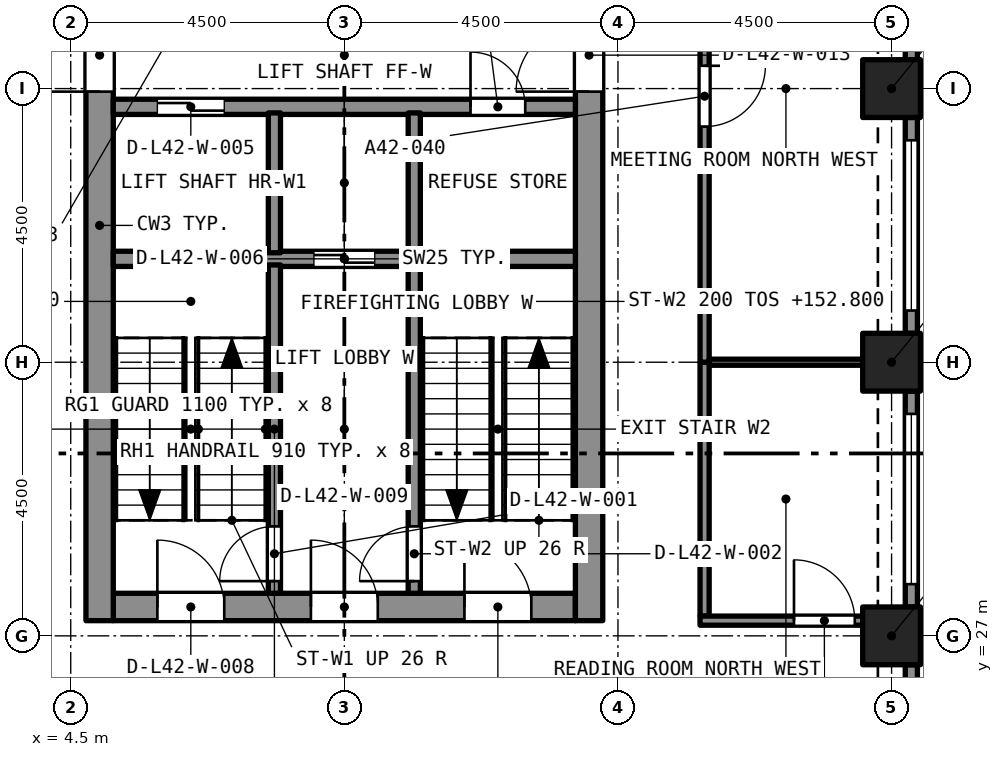
"""IFC4 building model, lengths in metres.
Left out: names, types, materials, properties, quantities, classifications, styles, units other than length and angle.
Written with IfcOpenShell. Run it as: python <this file> out.ifc"""

import sys

from ifc_helpers import new_model, si_unit, direction, frame, frame_2d, origin, origin_2d, place, context, subcontext, project, spatial, rectangle, extrude, element, fill, save


model = new_model("IFC4")
c1 = context("Model", 3, precision=1e-05, world=origin(), true_north=direction((0.0, 1.0)))
c2 = subcontext(c1, "Body", "Model", "MODEL_VIEW")
j1 = project(units=[si_unit("LENGTHUNIT", "METRE"), si_unit("PLANEANGLEUNIT", "RADIAN")], contexts=[c1])
p1 = place(None, origin())
s1 = spatial("IfcSite", under=j1, at=p1, CompositionType="ELEMENT")
p2 = place(p1, origin())
s2 = spatial("IfcBuilding", under=s1, at=p2, CompositionType="ELEMENT")
p3 = place(p2, frame((0.0, 0.0, 150.6)))
s3 = spatial("IfcBuildingStorey", under=s2, at=p3, CompositionType="ELEMENT", Elevation=150.6)
for number, where, z_axis, x_axis in (
    (1, (18.0, 27.0, 0.0), (0.0, 0.0, 1.0), (1.0, 0.0, 0.0)),
    (2, (18.0, 31.5, 0.0), (0.0, 0.0, 1.0), (1.0, 0.0, 0.0)),
    (3, (18.0, 36.0, 0.0), (0.0, 0.0, 1.0), (1.0, 0.0, 0.0)),
):
    element("IfcColumn", number, at=place(p3, frame(where, z_axis=z_axis, x_axis=x_axis)), inside=s3, PredefinedType="COLUMN", context=c2, shape_type="SweptSolid", body=[
        extrude(rectangle(XDim=0.95, YDim=0.95, at=origin_2d()), origin(), (0.0, 0.0, 1.0), 4.4),
    ])
p4 = place(p3, frame((5.2, 27.475, 0.0), z_axis=(0.0, 0.0, 1.0), x_axis=(1.0, 0.0, 0.0)))
e4 = element("IfcWall", 4, at=p4, inside=s3, PredefinedType="SOLIDWALL", context=c2, shape_type="SweptSolid", body=[
    extrude(rectangle(XDim=7.6, YDim=0.45, at=frame_2d((3.8, 0.0))), origin(), (0.0, 0.0, 1.0), 4.4),
])
p5 = place(p4, frame((0.725, 0.0, 0.0)))
e5 = element("IfcOpeningElement", 5, at=p5, cuts=e4, PredefinedType="OPENING", context=c2, shape_type="SweptSolid", body=[
    extrude(rectangle(XDim=1.1, YDim=2.1, at=frame_2d((0.55, 1.05))), frame((0.0, 0.235, 0.0), z_axis=(0.0, -1.0, 0.0), x_axis=(1.0, 0.0, 0.0)), (0.0, 0.0, 1.0), 0.47),
])
p6 = place(p4, frame((3.25, 0.0, 0.0)))
e6 = element("IfcOpeningElement", 6, at=p6, cuts=e4, PredefinedType="OPENING", context=c2, shape_type="SweptSolid", body=[
    extrude(rectangle(XDim=1.1, YDim=2.1, at=frame_2d((0.55, 1.05))), frame((0.0, 0.235, 0.0), z_axis=(0.0, -1.0, 0.0), x_axis=(1.0, 0.0, 0.0)), (0.0, 0.0, 1.0), 0.47),
])
p7 = place(p4, frame((5.775, 0.0, 0.0)))
e7 = element("IfcOpeningElement", 7, at=p7, cuts=e4, PredefinedType="OPENING", context=c2, shape_type="SweptSolid", body=[
    extrude(rectangle(XDim=1.1, YDim=2.1, at=frame_2d((0.55, 1.05))), frame((0.0, 0.235, 0.0), z_axis=(0.0, -1.0, 0.0), x_axis=(1.0, 0.0, 0.0)), (0.0, 0.0, 1.0), 0.47),
])
p8 = place(p3, frame((4.975, 27.25, 0.0), z_axis=(0.0, 0.0, 1.0), x_axis=(0.0, 1.0, 0.0)))
e8 = element("IfcWall", 8, at=p8, inside=s3, PredefinedType="SOLIDWALL", context=c2, shape_type="SweptSolid", body=[
    extrude(rectangle(XDim=13.0, YDim=0.45, at=frame_2d((6.5, 0.0))), origin(), (0.0, 0.0, 1.0), 4.4),
])
p9 = place(p8, frame((8.7, 0.0, 0.0)))
e9 = element("IfcOpeningElement", 9, at=p9, cuts=e8, PredefinedType="OPENING", context=c2, shape_type="SweptSolid", body=[
    extrude(rectangle(XDim=1.2, YDim=2.1, at=frame_2d((0.6, 1.05))), frame((0.0, 0.235, 0.0), z_axis=(0.0, -1.0, 0.0), x_axis=(1.0, 0.0, 0.0)), (0.0, 0.0, 1.0), 0.47),
])
p10 = place(p3, frame((13.025, 27.25, 0.0), z_axis=(0.0, 0.0, 1.0), x_axis=(0.0, 1.0, 0.0)))
e10 = element("IfcWall", 10, at=p10, inside=s3, PredefinedType="SOLIDWALL", context=c2, shape_type="SweptSolid", body=[
    extrude(rectangle(XDim=13.0, YDim=0.45, at=frame_2d((6.5, 0.0))), origin(), (0.0, 0.0, 1.0), 4.4),
])
p11 = place(p10, frame((10.85, 0.0, 0.0)))
e11 = element("IfcOpeningElement", 11, at=p11, cuts=e10, PredefinedType="OPENING", context=c2, shape_type="SweptSolid", body=[
    extrude(rectangle(XDim=1.1, YDim=2.1, at=frame_2d((0.55, 1.05))), frame((0.0, 0.235, 0.0), z_axis=(0.0, -1.0, 0.0), x_axis=(1.0, 0.0, 0.0)), (0.0, 0.0, 1.0), 0.47),
])
p12 = place(p10, frame((8.7, 0.0, 0.0)))
e12 = element("IfcOpeningElement", 12, at=p12, cuts=e10, PredefinedType="OPENING", context=c2, shape_type="SweptSolid", body=[
    extrude(rectangle(XDim=1.2, YDim=2.1, at=frame_2d((0.6, 1.05))), frame((0.0, 0.235, 0.0), z_axis=(0.0, -1.0, 0.0), x_axis=(1.0, 0.0, 0.0)), (0.0, 0.0, 1.0), 0.47),
])
p13 = place(p3, frame((18.325, 26.525, 0.0), z_axis=(0.0, 0.0, 1.0), x_axis=(0.0, -1.0, 0.0)))
e13 = element("IfcWall", 13, at=p13, inside=s3, PredefinedType="SOLIDWALL", context=c2, shape_type="SweptSolid", body=[
    extrude(rectangle(XDim=3.55, YDim=0.2, at=frame_2d((1.775, 0.0))), origin(), (0.0, 0.0, 1.0), 4.4),
])
p14 = place(p13, frame((0.375, 0.0, 0.45)))
e14 = element("IfcOpeningElement", 14, at=p14, cuts=e13, PredefinedType="OPENING", context=c2, shape_type="SweptSolid", body=[
    extrude(rectangle(XDim=2.8, YDim=2.55, at=frame_2d((1.4, 1.275))), frame((0.0, 0.11, 0.0), z_axis=(0.0, -1.0, 0.0), x_axis=(1.0, 0.0, 0.0)), (0.0, 0.0, 1.0), 0.22),
])
p15 = place(p3, frame((18.325, 31.025, 0.0), z_axis=(0.0, 0.0, 1.0), x_axis=(0.0, -1.0, 0.0)))
e15 = element("IfcWall", 15, at=p15, inside=s3, PredefinedType="SOLIDWALL", context=c2, shape_type="SweptSolid", body=[
    extrude(rectangle(XDim=3.55, YDim=0.2, at=frame_2d((1.775, 0.0))), origin(), (0.0, 0.0, 1.0), 4.4),
])
p16 = place(p15, frame((0.375, 0.0, 0.45)))
e16 = element("IfcOpeningElement", 16, at=p16, cuts=e15, PredefinedType="OPENING", context=c2, shape_type="SweptSolid", body=[
    extrude(rectangle(XDim=2.8, YDim=2.55, at=frame_2d((1.4, 1.275))), frame((0.0, 0.11, 0.0), z_axis=(0.0, -1.0, 0.0), x_axis=(1.0, 0.0, 0.0)), (0.0, 0.0, 1.0), 0.22),
])
p17 = place(p3, frame((18.325, 35.525, 0.0), z_axis=(0.0, 0.0, 1.0), x_axis=(0.0, -1.0, 0.0)))
e17 = element("IfcWall", 17, at=p17, inside=s3, PredefinedType="SOLIDWALL", context=c2, shape_type="SweptSolid", body=[
    extrude(rectangle(XDim=3.55, YDim=0.2, at=frame_2d((1.775, 0.0))), origin(), (0.0, 0.0, 1.0), 4.4),
])
p18 = place(p17, frame((0.375, 0.0, 0.45)))
e18 = element("IfcOpeningElement", 18, at=p18, cuts=e17, PredefinedType="OPENING", context=c2, shape_type="SweptSolid", body=[
    extrude(rectangle(XDim=2.8, YDim=2.55, at=frame_2d((1.4, 1.275))), frame((0.0, 0.11, 0.0), z_axis=(0.0, -1.0, 0.0), x_axis=(1.0, 0.0, 0.0)), (0.0, 0.0, 1.0), 0.22),
])
p19 = place(p3, frame((18.325, 40.025, 0.0), z_axis=(0.0, 0.0, 1.0), x_axis=(0.0, -1.0, 0.0)))
e19 = element("IfcWall", 19, at=p19, inside=s3, PredefinedType="SOLIDWALL", context=c2, shape_type="SweptSolid", body=[
    extrude(rectangle(XDim=3.55, YDim=0.2, at=frame_2d((1.775, 0.0))), origin(), (0.0, 0.0, 1.0), 4.4),
])
p20 = place(p19, frame((0.375, 0.0, 0.45)))
e20 = element("IfcOpeningElement", 20, at=p20, cuts=e19, PredefinedType="OPENING", context=c2, shape_type="SweptSolid", body=[
    extrude(rectangle(XDim=2.8, YDim=2.55, at=frame_2d((1.4, 1.275))), frame((0.0, 0.11, 0.0), z_axis=(0.0, -1.0, 0.0), x_axis=(1.0, 0.0, 0.0)), (0.0, 0.0, 1.0), 0.22),
])
p21 = place(p3, frame((14.925, 27.325, 0.0), z_axis=(0.0, 0.0, 1.0), x_axis=(0.0, 1.0, 0.0)))
e21 = element("IfcWall", 21, at=p21, inside=s3, PredefinedType="PARTITIONING", context=c2, shape_type="SweptSolid", body=[
    extrude(rectangle(XDim=4.175, YDim=0.15, at=frame_2d((2.087, 0.0))), origin(), (0.0, 0.0, 1.0), 4.1),
])
p22 = place(p3, frame((14.85, 27.25, 0.0), z_axis=(0.0, 0.0, 1.0), x_axis=(1.0, 0.0, 0.0)))
e22 = element("IfcWall", 22, at=p22, inside=s3, PredefinedType="PARTITIONING", context=c2, shape_type="SweptSolid", body=[
    extrude(rectangle(XDim=2.675, YDim=0.15, at=frame_2d((1.337, 0.0))), origin(), (0.0, 0.0, 1.0), 4.1),
])
p23 = place(p22, frame((1.545, 0.0, 0.0)))
e23 = element("IfcOpeningElement", 23, at=p23, cuts=e22, PredefinedType="OPENING", context=c2, shape_type="SweptSolid", body=[
    extrude(rectangle(XDim=1.0, YDim=2.1, at=frame_2d((0.5, 1.05))), frame((0.0, 0.085, 0.0), z_axis=(0.0, -1.0, 0.0), x_axis=(1.0, 0.0, 0.0)), (0.0, 0.0, 1.0), 0.17),
])
p24 = place(p3, frame((14.925, 40.175, 0.0), z_axis=(0.0, 0.0, 1.0), x_axis=(0.0, -1.0, 0.0)))
e24 = element("IfcWall", 24, at=p24, inside=s3, PredefinedType="PARTITIONING", context=c2, shape_type="SweptSolid", body=[
    extrude(rectangle(XDim=8.675, YDim=0.15, at=frame_2d((4.337, 0.0))), origin(), (0.0, 0.0, 1.0), 4.1),
])
p25 = place(p24, frame((3.8, 0.0, 0.0)))
e25 = element("IfcOpeningElement", 25, at=p25, cuts=e24, PredefinedType="OPENING", context=c2, shape_type="SweptSolid", body=[
    extrude(rectangle(XDim=1.0, YDim=2.1, at=frame_2d((0.5, 1.05))), frame((0.0, 0.085, 0.0), z_axis=(0.0, -1.0, 0.0), x_axis=(1.0, 0.0, 0.0)), (0.0, 0.0, 1.0), 0.17),
])
p26 = place(p3, frame((15.0, 31.5, 0.0), z_axis=(0.0, 0.0, 1.0), x_axis=(1.0, 0.0, 0.0)))
e26 = element("IfcWall", 26, at=p26, inside=s3, PredefinedType="PARTITIONING", context=c2, shape_type="SweptSolid", body=[
    extrude(rectangle(XDim=2.525, YDim=0.1, at=frame_2d((1.262, 0.0))), origin(), (0.0, 0.0, 1.0), 4.1),
])
p27 = place(p3, frame((5.2, 33.2, 0.0), z_axis=(0.0, 0.0, 1.0), x_axis=(1.0, 0.0, 0.0)))
e27 = element("IfcWall", 27, at=p27, inside=s3, PredefinedType="SOLIDWALL", context=c2, shape_type="SweptSolid", body=[
    extrude(rectangle(XDim=7.6, YDim=0.25, at=frame_2d((3.8, 0.0))), origin(), (0.0, 0.0, 1.0), 4.1),
])
p28 = place(p27, frame((3.3, 0.0, 0.0)))
e28 = element("IfcOpeningElement", 28, at=p28, cuts=e27, PredefinedType="OPENING", context=c2, shape_type="SweptSolid", body=[
    extrude(rectangle(XDim=1.0, YDim=2.1, at=frame_2d((0.5, 1.05))), frame((0.0, 0.135, 0.0), z_axis=(0.0, -1.0, 0.0), x_axis=(1.0, 0.0, 0.0)), (0.0, 0.0, 1.0), 0.27),
])
p29 = place(p3, frame((5.2, 35.7, 0.0), z_axis=(0.0, 0.0, 1.0), x_axis=(1.0, 0.0, 0.0)))
e29 = element("IfcWall", 29, at=p29, inside=s3, PredefinedType="SOLIDWALL", context=c2, shape_type="SweptSolid", body=[
    extrude(rectangle(XDim=7.6, YDim=0.25, at=frame_2d((3.8, 0.0))), origin(), (0.0, 0.0, 1.0), 4.1),
])
p30 = place(p29, frame((0.725, 0.0, 0.0)))
e30 = element("IfcOpeningElement", 30, at=p30, cuts=e29, PredefinedType="OPENING", context=c2, shape_type="SweptSolid", body=[
    extrude(rectangle(XDim=1.1, YDim=2.4, at=frame_2d((0.55, 1.2))), frame((0.0, 0.135, 0.0), z_axis=(0.0, -1.0, 0.0), x_axis=(1.0, 0.0, 0.0)), (0.0, 0.0, 1.0), 0.27),
])
p31 = place(p29, frame((5.875, 0.0, 0.0)))
e31 = element("IfcOpeningElement", 31, at=p31, cuts=e29, PredefinedType="OPENING", context=c2, shape_type="SweptSolid", body=[
    extrude(rectangle(XDim=0.9, YDim=2.1, at=frame_2d((0.45, 1.05))), frame((0.0, 0.135, 0.0), z_axis=(0.0, -1.0, 0.0), x_axis=(1.0, 0.0, 0.0)), (0.0, 0.0, 1.0), 0.27),
])
p32 = place(p3, frame((7.85, 27.7, 0.0), z_axis=(0.0, 0.0, 1.0), x_axis=(0.0, 1.0, 0.0)))
e32 = element("IfcWall", 32, at=p32, inside=s3, PredefinedType="SOLIDWALL", context=c2, shape_type="SweptSolid", body=[
    extrude(rectangle(XDim=5.4, YDim=0.2, at=frame_2d((2.7, 0.0))), origin(), (0.0, 0.0, 1.0), 4.1),
])
p33 = place(p32, frame((0.2, 0.0, 0.0)))
e33 = element("IfcOpeningElement", 33, at=p33, cuts=e32, PredefinedType="OPENING", context=c2, shape_type="SweptSolid", body=[
    extrude(rectangle(XDim=0.9, YDim=2.1, at=frame_2d((0.45, 1.05))), frame((0.0, 0.11, 0.0), z_axis=(0.0, -1.0, 0.0), x_axis=(1.0, 0.0, 0.0)), (0.0, 0.0, 1.0), 0.22),
])
p34 = place(p3, frame((10.15, 27.7, 0.0), z_axis=(0.0, 0.0, 1.0), x_axis=(0.0, 1.0, 0.0)))
e34 = element("IfcWall", 34, at=p34, inside=s3, PredefinedType="SOLIDWALL", context=c2, shape_type="SweptSolid", body=[
    extrude(rectangle(XDim=5.4, YDim=0.2, at=frame_2d((2.7, 0.0))), origin(), (0.0, 0.0, 1.0), 4.1),
])
p35 = place(p34, frame((0.2, 0.0, 0.0)))
e35 = element("IfcOpeningElement", 35, at=p35, cuts=e34, PredefinedType="OPENING", context=c2, shape_type="SweptSolid", body=[
    extrude(rectangle(XDim=0.9, YDim=2.1, at=frame_2d((0.45, 1.05))), frame((0.0, 0.11, 0.0), z_axis=(0.0, -1.0, 0.0), x_axis=(1.0, 0.0, 0.0)), (0.0, 0.0, 1.0), 0.22),
])
for number, where, z_axis, x_axis in (
    (36, (7.85, 33.3, 0.0), (0.0, 0.0, 1.0), (0.0, 1.0, 0.0)),
    (37, (10.15, 33.3, 0.0), (0.0, 0.0, 1.0), (0.0, 1.0, 0.0)),
):
    element("IfcWall", number, at=place(p3, frame(where, z_axis=z_axis, x_axis=x_axis)), inside=s3, PredefinedType="SOLIDWALL", context=c2, shape_type="SweptSolid", body=[
        extrude(rectangle(XDim=2.3, YDim=0.2, at=frame_2d((1.15, 0.0))), origin(), (0.0, 0.0, 1.0), 4.1),
    ])
p36 = place(p16, origin())
e38 = element("IfcWindow", 38, at=p36, inside=s3, PartitioningType="SINGLE_PANEL", PredefinedType="WINDOW", context=c2, shape_type="SweptSolid", body=[
    extrude(rectangle(XDim=2.8, YDim=2.55, at=frame_2d((1.4, 1.275))), frame((0.0, 0.03, 0.0), z_axis=(0.0, -1.0, 0.0), x_axis=(1.0, 0.0, 0.0)), (0.0, 0.0, 1.0), 0.06),
])
fill(e16, e38)
p37 = place(p18, origin())
e39 = element("IfcWindow", 39, at=p37, inside=s3, PartitioningType="SINGLE_PANEL", PredefinedType="WINDOW", context=c2, shape_type="SweptSolid", body=[
    extrude(rectangle(XDim=2.8, YDim=2.55, at=frame_2d((1.4, 1.275))), frame((0.0, 0.03, 0.0), z_axis=(0.0, -1.0, 0.0), x_axis=(1.0, 0.0, 0.0)), (0.0, 0.0, 1.0), 0.06),
])
fill(e18, e39)
p38 = place(p23, origin())
e40 = element("IfcDoor", 40, at=p38, inside=s3, OperationType="SINGLE_SWING_RIGHT", PredefinedType="DOOR", context=c2, shape_type="SweptSolid", body=[
    extrude(rectangle(XDim=1.0, YDim=2.1, at=frame_2d((0.5, 1.05))), frame((0.0, 0.025, 0.0), z_axis=(0.0, -1.0, 0.0), x_axis=(1.0, 0.0, 0.0)), (0.0, 0.0, 1.0), 0.05),
])
fill(e23, e40)
p39 = place(p25, origin())
e41 = element("IfcDoor", 41, at=p39, inside=s3, OperationType="SINGLE_SWING_LEFT", PredefinedType="DOOR", context=c2, shape_type="SweptSolid", body=[
    extrude(rectangle(XDim=1.0, YDim=2.1, at=frame_2d((0.5, 1.05))), frame((0.0, 0.025, 0.0), z_axis=(0.0, -1.0, 0.0), x_axis=(1.0, 0.0, 0.0)), (0.0, 0.0, 1.0), 0.05),
])
fill(e25, e41)
p40 = place(p33, origin())
e42 = element("IfcDoor", 42, at=p40, inside=s3, OperationType="SINGLE_SWING_LEFT", PredefinedType="DOOR", context=c2, shape_type="SweptSolid", body=[
    extrude(rectangle(XDim=0.9, YDim=2.1, at=frame_2d((0.45, 1.05))), frame((0.0, 0.025, 0.0), z_axis=(0.0, -1.0, 0.0), x_axis=(1.0, 0.0, 0.0)), (0.0, 0.0, 1.0), 0.05),
])
fill(e33, e42)
p41 = place(p35, origin())
e43 = element("IfcDoor", 43, at=p41, inside=s3, OperationType="SINGLE_SWING_LEFT", PredefinedType="DOOR", context=c2, shape_type="SweptSolid", body=[
    extrude(rectangle(XDim=0.9, YDim=2.1, at=frame_2d((0.45, 1.05))), frame((0.0, 0.025, 0.0), z_axis=(0.0, -1.0, 0.0), x_axis=(1.0, 0.0, 0.0)), (0.0, 0.0, 1.0), 0.05),
])
fill(e35, e43)
p42 = place(p30, origin())
e44 = element("IfcDoor", 44, at=p42, inside=s3, OperationType="SLIDING_TO_LEFT", PredefinedType="DOOR", context=c2, shape_type="SweptSolid", body=[
    extrude(rectangle(XDim=1.1, YDim=2.4, at=frame_2d((0.55, 1.2))), frame((0.0, 0.025, 0.0), z_axis=(0.0, -1.0, 0.0), x_axis=(1.0, 0.0, 0.0)), (0.0, 0.0, 1.0), 0.05),
])
fill(e30, e44)
p43 = place(p28, origin())
e45 = element("IfcDoor", 45, at=p43, inside=s3, OperationType="SLIDING_TO_LEFT", PredefinedType="DOOR", context=c2, shape_type="SweptSolid", body=[
    extrude(rectangle(XDim=1.0, YDim=2.1, at=frame_2d((0.5, 1.05))), frame((0.0, 0.025, 0.0), z_axis=(0.0, -1.0, 0.0), x_axis=(1.0, 0.0, 0.0)), (0.0, 0.0, 1.0), 0.05),
])
fill(e28, e45)
p44 = place(p31, origin())
e46 = element("IfcDoor", 46, at=p44, inside=s3, OperationType="SINGLE_SWING_LEFT", PredefinedType="DOOR", context=c2, shape_type="SweptSolid", body=[
    extrude(rectangle(XDim=0.9, YDim=2.1, at=frame_2d((0.45, 1.05))), frame((0.0, 0.025, 0.0), z_axis=(0.0, -1.0, 0.0), x_axis=(1.0, 0.0, 0.0)), (0.0, 0.0, 1.0), 0.05),
])
fill(e31, e46)
p45 = place(p5, origin())
e47 = element("IfcDoor", 47, at=p45, inside=s3, OperationType="SINGLE_SWING_LEFT", PredefinedType="DOOR", context=c2, shape_type="SweptSolid", body=[
    extrude(rectangle(XDim=1.1, YDim=2.1, at=frame_2d((0.55, 1.05))), frame((0.0, 0.025, 0.0), z_axis=(0.0, -1.0, 0.0), x_axis=(1.0, 0.0, 0.0)), (0.0, 0.0, 1.0), 0.05),
])
fill(e5, e47)
p46 = place(p6, origin())
e48 = element("IfcDoor", 48, at=p46, inside=s3, OperationType="SINGLE_SWING_LEFT", PredefinedType="DOOR", context=c2, shape_type="SweptSolid", body=[
    extrude(rectangle(XDim=1.1, YDim=2.1, at=frame_2d((0.55, 1.05))), frame((0.0, 0.025, 0.0), z_axis=(0.0, -1.0, 0.0), x_axis=(1.0, 0.0, 0.0)), (0.0, 0.0, 1.0), 0.05),
])
fill(e6, e48)
p47 = place(p7, origin())
e49 = element("IfcDoor", 49, at=p47, inside=s3, OperationType="SINGLE_SWING_LEFT", PredefinedType="DOOR", context=c2, shape_type="SweptSolid", body=[
    extrude(rectangle(XDim=1.1, YDim=2.1, at=frame_2d((0.55, 1.05))), frame((0.0, 0.025, 0.0), z_axis=(0.0, -1.0, 0.0), x_axis=(1.0, 0.0, 0.0)), (0.0, 0.0, 1.0), 0.05),
])
fill(e7, e49)
p48 = place(p9, origin())
e50 = element("IfcDoor", 50, at=p48, inside=s3, OperationType="SINGLE_SWING_LEFT", PredefinedType="DOOR", context=c2, shape_type="SweptSolid", body=[
    extrude(rectangle(XDim=1.2, YDim=2.1, at=frame_2d((0.6, 1.05))), frame((0.0, 0.025, 0.0), z_axis=(0.0, -1.0, 0.0), x_axis=(1.0, 0.0, 0.0)), (0.0, 0.0, 1.0), 0.05),
])
fill(e9, e50)
p49 = place(p12, origin())
e51 = element("IfcDoor", 51, at=p49, inside=s3, OperationType="SINGLE_SWING_LEFT", PredefinedType="DOOR", context=c2, shape_type="SweptSolid", body=[
    extrude(rectangle(XDim=1.2, YDim=2.1, at=frame_2d((0.6, 1.05))), frame((0.0, 0.025, 0.0), z_axis=(0.0, -1.0, 0.0), x_axis=(1.0, 0.0, 0.0)), (0.0, 0.0, 1.0), 0.05),
])
fill(e12, e51)
save(model, sys.argv[1])
